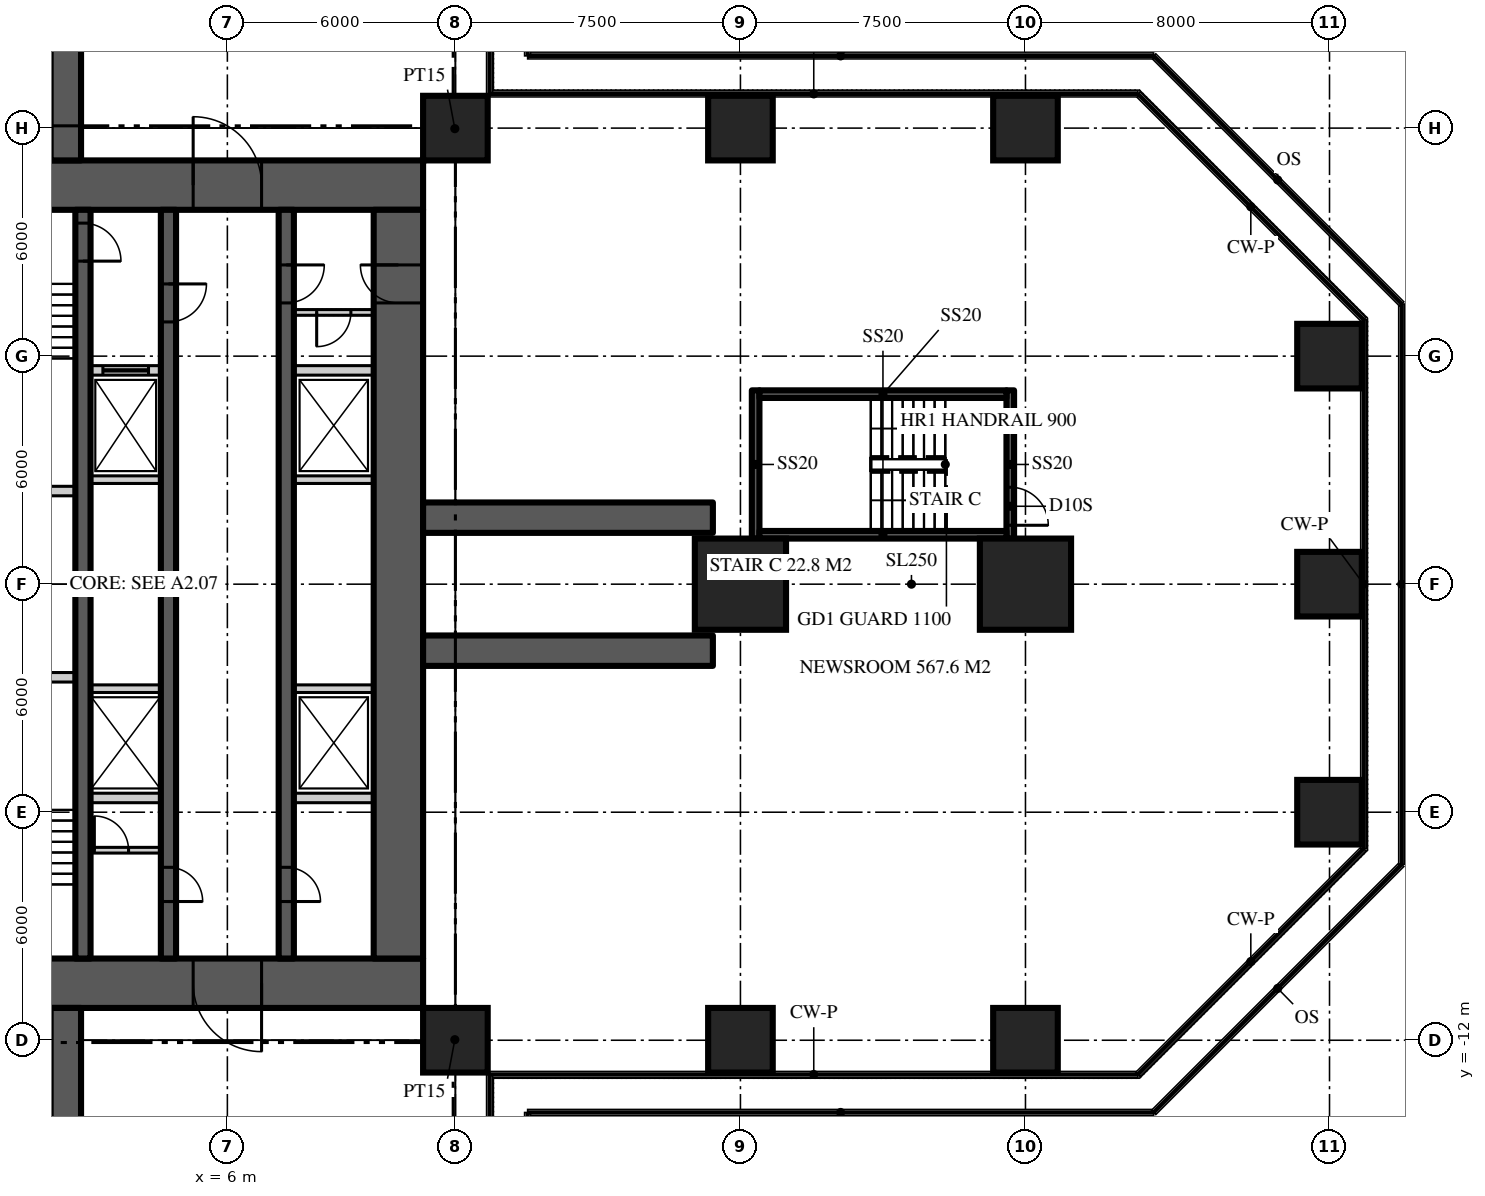
"""IFC4 building model, lengths in metres.
Left out: names, types, materials, properties, quantities, classifications, styles, units other than length and angle.
Written with IfcOpenShell. Run it as: python <this file> out.ifc"""

import sys

from ifc_helpers import new_model, si_unit, direction, frame, frame_2d, origin, origin_2d, place, context, subcontext, project, spatial, rectangle, extrude, element, fill, save


model = new_model("IFC4")
c1 = context("Model", 3, precision=1e-05, world=origin(), true_north=direction((0.0, 1.0)))
c2 = subcontext(c1, "Body", "Model", "MODEL_VIEW")
j1 = project(units=[si_unit("LENGTHUNIT", "METRE"), si_unit("PLANEANGLEUNIT", "RADIAN")], contexts=[c1])
p1 = place(None, origin())
s1 = spatial("IfcSite", under=j1, at=p1, CompositionType="ELEMENT")
p2 = place(p1, origin())
s2 = spatial("IfcBuilding", under=s1, at=p2, CompositionType="ELEMENT")
p3 = place(p2, frame((0.0, 0.0, 28.0)))
s3 = spatial("IfcBuildingStorey", under=s2, at=p3, CompositionType="ELEMENT", Elevation=28.0)
p4 = place(p3, frame((-11.15, 10.5, 0.0), z_axis=(0.0, 0.0, 1.0), x_axis=(1.0, 0.0, 0.0)))
e1 = element("IfcWall", 1, at=p4, inside=s3, PredefinedType="SHEAR", context=c2, shape_type="SweptSolid", body=[
    extrude(rectangle(XDim=22.3, YDim=1.3, at=frame_2d((11.15, 0.0))), origin(), (0.0, 0.0, 1.0), 5.0),
])
p5 = place(p4, frame((4.25, 0.0, 0.0)))
e2 = element("IfcOpeningElement", 2, at=p5, cuts=e1, PredefinedType="OPENING", context=c2, shape_type="SweptSolid", body=[
    extrude(rectangle(XDim=1.8, YDim=2.2, at=frame_2d((0.9, 1.1))), frame((0.0, 0.66, 0.0), z_axis=(0.0, -1.0, 0.0), x_axis=(1.0, 0.0, 0.0)), (0.0, 0.0, 1.0), 1.32),
])
p6 = place(p4, frame((16.25, 0.0, 0.0)))
e3 = element("IfcOpeningElement", 3, at=p6, cuts=e1, PredefinedType="OPENING", context=c2, shape_type="SweptSolid", body=[
    extrude(rectangle(XDim=1.8, YDim=2.2, at=frame_2d((0.9, 1.1))), frame((0.0, 0.66, 0.0), z_axis=(0.0, -1.0, 0.0), x_axis=(1.0, 0.0, 0.0)), (0.0, 0.0, 1.0), 1.32),
])
p7 = place(p3, frame((11.15, -10.5, 0.0), z_axis=(0.0, 0.0, 1.0), x_axis=(-1.0, 0.0, 0.0)))
e4 = element("IfcWall", 4, at=p7, inside=s3, PredefinedType="SHEAR", context=c2, shape_type="SweptSolid", body=[
    extrude(rectangle(XDim=22.3, YDim=1.3, at=frame_2d((11.15, 0.0))), origin(), (0.0, 0.0, 1.0), 5.0),
])
p8 = place(p7, frame((16.25, 0.0, 0.0)))
e5 = element("IfcOpeningElement", 5, at=p8, cuts=e4, PredefinedType="OPENING", context=c2, shape_type="SweptSolid", body=[
    extrude(rectangle(XDim=1.8, YDim=2.2, at=frame_2d((0.9, 1.1))), frame((0.0, 0.66, 0.0), z_axis=(0.0, -1.0, 0.0), x_axis=(1.0, 0.0, 0.0)), (0.0, 0.0, 1.0), 1.32),
])
p9 = place(p7, frame((4.25, 0.0, 0.0)))
e6 = element("IfcOpeningElement", 6, at=p9, cuts=e4, PredefinedType="OPENING", context=c2, shape_type="SweptSolid", body=[
    extrude(rectangle(XDim=1.8, YDim=2.2, at=frame_2d((0.9, 1.1))), frame((0.0, 0.66, 0.0), z_axis=(0.0, -1.0, 0.0), x_axis=(1.0, 0.0, 0.0)), (0.0, 0.0, 1.0), 1.32),
])
p10 = place(p3, frame((10.5, -9.85, 0.0), z_axis=(0.0, 0.0, 1.0), x_axis=(0.0, 1.0, 0.0)))
e7 = element("IfcWall", 7, at=p10, inside=s3, PredefinedType="SHEAR", context=c2, shape_type="SweptSolid", body=[
    extrude(rectangle(XDim=19.7, YDim=1.3, at=frame_2d((9.85, 0.0))), origin(), (0.0, 0.0, 1.0), 5.0),
])
p11 = place(p10, frame((17.25, 0.0, 0.0)))
e8 = element("IfcOpeningElement", 8, at=p11, cuts=e7, PredefinedType="OPENING", context=c2, shape_type="SweptSolid", body=[
    extrude(rectangle(XDim=1.0, YDim=2.2, at=frame_2d((0.5, 1.1))), frame((0.0, 0.66, 0.0), z_axis=(0.0, -1.0, 0.0), x_axis=(1.0, 0.0, 0.0)), (0.0, 0.0, 1.0), 1.32),
])
for number, where, z_axis, x_axis in (
    (9, (11.15, -1.75, 0.0), (0.0, 0.0, 1.0), (1.0, 0.0, 0.0)),
    (10, (11.15, 1.75, 0.0), (0.0, 0.0, 1.0), (1.0, 0.0, 0.0)),
    (11, (1.75, 11.15, 0.0), (0.0, 0.0, 1.0), (0.0, 1.0, 0.0)),
    (12, (1.75, -11.15, 0.0), (0.0, 0.0, 1.0), (0.0, -1.0, 0.0)),
):
    element("IfcWall", number, at=place(p3, frame(where, z_axis=z_axis, x_axis=x_axis)), inside=s3, PredefinedType="SHEAR", context=c2, shape_type="SweptSolid", body=[
        extrude(rectangle(XDim=7.625, YDim=0.8, at=frame_2d((3.812, 0.0))), origin(), (0.0, 0.0, 1.0), 5.0),
    ])
for number, where, z_axis, x_axis in (
    (13, (12.0, -12.0, 0.0), (0.0, 0.0, 1.0), (1.0, 0.0, 0.0)),
    (14, (19.5, -12.0, 0.0), (0.0, 0.0, 1.0), (1.0, 0.0, 0.0)),
    (15, (27.0, -12.0, 0.0), (0.0, 0.0, 1.0), (1.0, 0.0, 0.0)),
    (16, (35.0, -6.0, 0.0), (0.0, 0.0, 1.0), (1.0, 0.0, 0.0)),
):
    element("IfcColumn", number, at=place(p3, frame(where, z_axis=z_axis, x_axis=x_axis)), inside=s3, PredefinedType="COLUMN", context=c2, shape_type="SweptSolid", body=[
        extrude(rectangle(XDim=1.7, YDim=1.7, at=origin_2d()), origin(), (0.0, 0.0, 1.0), 5.0),
    ])
for number, where, z_axis, x_axis in (
    (17, (19.5, 0.0, 0.0), (0.0, 0.0, 1.0), (1.0, 0.0, 0.0)),
    (18, (27.0, 0.0, 0.0), (0.0, 0.0, 1.0), (1.0, 0.0, 0.0)),
):
    element("IfcColumn", number, at=place(p3, frame(where, z_axis=z_axis, x_axis=x_axis)), inside=s3, PredefinedType="COLUMN", context=c2, shape_type="SweptSolid", body=[
        extrude(rectangle(XDim=2.4, YDim=2.4, at=origin_2d()), origin(), (0.0, 0.0, 1.0), 5.0),
    ])
for number, where, z_axis, x_axis in (
    (19, (35.0, 0.0, 0.0), (0.0, 0.0, 1.0), (1.0, 0.0, 0.0)),
    (20, (35.0, 6.0, 0.0), (0.0, 0.0, 1.0), (1.0, 0.0, 0.0)),
    (21, (12.0, 12.0, 0.0), (0.0, 0.0, 1.0), (1.0, 0.0, 0.0)),
    (22, (19.5, 12.0, 0.0), (0.0, 0.0, 1.0), (1.0, 0.0, 0.0)),
    (23, (27.0, 12.0, 0.0), (0.0, 0.0, 1.0), (1.0, 0.0, 0.0)),
):
    element("IfcColumn", number, at=place(p3, frame(where, z_axis=z_axis, x_axis=x_axis)), inside=s3, PredefinedType="COLUMN", context=c2, shape_type="SweptSolid", body=[
        extrude(rectangle(XDim=1.7, YDim=1.7, at=origin_2d()), origin(), (0.0, 0.0, 1.0), 5.0),
    ])
p12 = place(p3, frame((7.55, 9.85, 0.0), z_axis=(0.0, 0.0, 1.0), x_axis=(0.0, -1.0, 0.0)))
e24 = element("IfcWall", 24, at=p12, inside=s3, PredefinedType="SHEAR", context=c2, shape_type="SweptSolid", body=[
    extrude(rectangle(XDim=19.7, YDim=0.4, at=frame_2d((9.85, 0.0))), origin(), (0.0, 0.0, 1.0), 5.0),
])
p13 = place(p12, frame((1.45, 0.0, 0.0)))
e25 = element("IfcOpeningElement", 25, at=p13, cuts=e24, PredefinedType="OPENING", context=c2, shape_type="SweptSolid", body=[
    extrude(rectangle(XDim=1.0, YDim=2.2, at=frame_2d((0.5, 1.1))), frame((0.0, 0.21, 0.0), z_axis=(0.0, -1.0, 0.0), x_axis=(1.0, 0.0, 0.0)), (0.0, 0.0, 1.0), 0.42),
])
p14 = place(p12, frame((17.3, 0.0, 0.0)))
e26 = element("IfcOpeningElement", 26, at=p14, cuts=e24, PredefinedType="OPENING", context=c2, shape_type="SweptSolid", body=[
    extrude(rectangle(XDim=0.9, YDim=2.1, at=frame_2d((0.45, 1.05))), frame((0.0, 0.21, 0.0), z_axis=(0.0, -1.0, 0.0), x_axis=(1.0, 0.0, 0.0)), (0.0, 0.0, 1.0), 0.42),
])
p15 = place(p3, frame((4.45, 9.85, 0.0), z_axis=(0.0, 0.0, 1.0), x_axis=(0.0, -1.0, 0.0)))
e27 = element("IfcWall", 27, at=p15, inside=s3, PredefinedType="SHEAR", context=c2, shape_type="SweptSolid", body=[
    extrude(rectangle(XDim=19.7, YDim=0.4, at=frame_2d((9.85, 0.0))), origin(), (0.0, 0.0, 1.0), 5.0),
])
p16 = place(p15, frame((1.95, 0.0, 0.0)))
e28 = element("IfcOpeningElement", 28, at=p16, cuts=e27, PredefinedType="OPENING", context=c2, shape_type="SweptSolid", body=[
    extrude(rectangle(XDim=1.0, YDim=2.2, at=frame_2d((0.5, 1.1))), frame((0.0, 0.21, 0.0), z_axis=(0.0, -1.0, 0.0), x_axis=(1.0, 0.0, 0.0)), (0.0, 0.0, 1.0), 0.42),
])
p17 = place(p15, frame((17.3, 0.0, 0.0)))
e29 = element("IfcOpeningElement", 29, at=p17, cuts=e27, PredefinedType="OPENING", context=c2, shape_type="SweptSolid", body=[
    extrude(rectangle(XDim=0.9, YDim=2.1, at=frame_2d((0.45, 1.05))), frame((0.0, 0.21, 0.0), z_axis=(0.0, -1.0, 0.0), x_axis=(1.0, 0.0, 0.0)), (0.0, 0.0, 1.0), 0.42),
])
p18 = place(p3, frame((2.2, 9.85, 0.0), z_axis=(0.0, 0.0, 1.0), x_axis=(0.0, -1.0, 0.0)))
e30 = element("IfcWall", 30, at=p18, inside=s3, PredefinedType="SHEAR", context=c2, shape_type="SweptSolid", body=[
    extrude(rectangle(XDim=19.7, YDim=0.4, at=frame_2d((9.85, 0.0))), origin(), (0.0, 0.0, 1.0), 5.0),
])
p19 = place(p18, frame((0.35, 0.0, 0.0)))
e31 = element("IfcOpeningElement", 31, at=p19, cuts=e30, PredefinedType="OPENING", context=c2, shape_type="SweptSolid", body=[
    extrude(rectangle(XDim=1.0, YDim=2.2, at=frame_2d((0.5, 1.1))), frame((0.0, 0.21, 0.0), z_axis=(0.0, -1.0, 0.0), x_axis=(1.0, 0.0, 0.0)), (0.0, 0.0, 1.0), 0.42),
])
p20 = place(p3, frame((2.4, 5.625, 0.0), z_axis=(0.0, 0.0, 1.0), x_axis=(1.0, 0.0, 0.0)))
e32 = element("IfcWall", 32, at=p20, inside=s3, PredefinedType="SOLIDWALL", context=c2, shape_type="SweptSolid", body=[
    extrude(rectangle(XDim=1.85, YDim=0.25, at=frame_2d((0.925, 0.0))), origin(), (0.0, 0.0, 1.0), 4.8),
])
p21 = place(p20, frame((0.325, 0.0, 0.0)))
e33 = element("IfcOpeningElement", 33, at=p21, cuts=e32, PredefinedType="OPENING", context=c2, shape_type="SweptSolid", body=[
    extrude(rectangle(XDim=1.2, YDim=2.2, at=frame_2d((0.6, 1.1))), frame((0.0, 0.135, 0.0), z_axis=(0.0, -1.0, 0.0), x_axis=(1.0, 0.0, 0.0)), (0.0, 0.0, 1.0), 0.27),
])
p22 = place(p3, frame((7.75, 5.625, 0.0), z_axis=(0.0, 0.0, 1.0), x_axis=(1.0, 0.0, 0.0)))
e34 = element("IfcWall", 34, at=p22, inside=s3, PredefinedType="SOLIDWALL", context=c2, shape_type="SweptSolid", body=[
    extrude(rectangle(XDim=2.1, YDim=0.25, at=frame_2d((1.05, 0.0))), origin(), (0.0, 0.0, 1.0), 4.8),
])
p23 = place(p3, frame((2.4, -5.625, 0.0), z_axis=(0.0, 0.0, 1.0), x_axis=(1.0, 0.0, 0.0)))
e35 = element("IfcWall", 35, at=p23, inside=s3, PredefinedType="SOLIDWALL", context=c2, shape_type="SweptSolid", body=[
    extrude(rectangle(XDim=1.85, YDim=0.25, at=frame_2d((0.925, 0.0))), origin(), (0.0, 0.0, 1.0), 4.8),
])
p24 = place(p3, frame((7.75, -5.625, 0.0), z_axis=(0.0, 0.0, 1.0), x_axis=(1.0, 0.0, 0.0)))
e36 = element("IfcWall", 36, at=p24, inside=s3, PredefinedType="SOLIDWALL", context=c2, shape_type="SweptSolid", body=[
    extrude(rectangle(XDim=2.1, YDim=0.25, at=frame_2d((1.05, 0.0))), origin(), (0.0, 0.0, 1.0), 4.8),
])
for number, where, z_axis, x_axis in (
    (37, (-2.0, -2.45, 0.0), (0.0, 0.0, 1.0), (1.0, 0.0, 0.0)),
    (38, (-2.0, 2.45, 0.0), (0.0, 0.0, 1.0), (1.0, 0.0, 0.0)),
):
    element("IfcWall", number, at=place(p3, frame(where, z_axis=z_axis, x_axis=x_axis)), inside=s3, PredefinedType="SOLIDWALL", context=c2, shape_type="SweptSolid", body=[
        extrude(rectangle(XDim=4.0, YDim=0.25, at=frame_2d((2.0, 0.0))), origin(), (0.0, 0.0, 1.0), 4.8),
    ])
p25 = place(p3, frame((2.4, -2.75, 0.0), z_axis=(0.0, 0.0, 1.0), x_axis=(1.0, 0.0, 0.0)))
e39 = element("IfcWall", 39, at=p25, inside=s3, PredefinedType="SOLIDWALL", context=c2, shape_type="SweptSolid", body=[
    extrude(rectangle(XDim=1.85, YDim=0.2, at=frame_2d((0.925, 0.0))), origin(), (0.0, 0.0, 1.0), 4.8),
])
p26 = place(p3, frame((7.75, -2.75, 0.0), z_axis=(0.0, 0.0, 1.0), x_axis=(1.0, 0.0, 0.0)))
e40 = element("IfcWall", 40, at=p26, inside=s3, PredefinedType="SOLIDWALL", context=c2, shape_type="SweptSolid", body=[
    extrude(rectangle(XDim=2.1, YDim=0.2, at=frame_2d((1.05, 0.0))), origin(), (0.0, 0.0, 1.0), 4.8),
])
p27 = place(p3, frame((2.4, 2.75, 0.0), z_axis=(0.0, 0.0, 1.0), x_axis=(1.0, 0.0, 0.0)))
e41 = element("IfcWall", 41, at=p27, inside=s3, PredefinedType="SOLIDWALL", context=c2, shape_type="SweptSolid", body=[
    extrude(rectangle(XDim=1.85, YDim=0.2, at=frame_2d((0.925, 0.0))), origin(), (0.0, 0.0, 1.0), 4.8),
])
p28 = place(p3, frame((7.75, 2.75, 0.0), z_axis=(0.0, 0.0, 1.0), x_axis=(1.0, 0.0, 0.0)))
e42 = element("IfcWall", 42, at=p28, inside=s3, PredefinedType="SOLIDWALL", context=c2, shape_type="SweptSolid", body=[
    extrude(rectangle(XDim=2.1, YDim=0.2, at=frame_2d((1.05, 0.0))), origin(), (0.0, 0.0, 1.0), 4.8),
])
for number, where, z_axis, x_axis in (
    (43, (11.15, 11.15, 0.0), (0.0, 0.0, 1.0), (0.707, 0.707, 0.0)),
    (44, (11.15, -11.15, 0.0), (0.0, 0.0, 1.0), (0.707, -0.707, 0.0)),
):
    element("IfcWall", number, at=place(p3, frame(where, z_axis=z_axis, x_axis=x_axis)), inside=s3, PredefinedType="PARTITIONING", context=c2, shape_type="SweptSolid", body=[
        extrude(rectangle(XDim=2.362, YDim=0.15, at=frame_2d((1.181, 0.0))), origin(), (0.0, 0.0, 1.0), 4.75),
    ])
p29 = place(p3, frame((2.4, -7.0, 0.0), z_axis=(0.0, 0.0, 1.0), x_axis=(1.0, 0.0, 0.0)))
e45 = element("IfcWall", 45, at=p29, inside=s3, PredefinedType="SOLIDWALL", context=c2, shape_type="SweptSolid", body=[
    extrude(rectangle(XDim=1.85, YDim=0.15, at=frame_2d((0.925, 0.0))), origin(), (0.0, 0.0, 1.0), 4.75),
])
p30 = place(p29, frame((0.1, 0.0, 0.0)))
e46 = element("IfcOpeningElement", 46, at=p30, cuts=e45, PredefinedType="OPENING", context=c2, shape_type="SweptSolid", body=[
    extrude(rectangle(XDim=0.9, YDim=2.1, at=frame_2d((0.45, 1.05))), frame((0.0, 0.085, 0.0), z_axis=(0.0, -1.0, 0.0), x_axis=(1.0, 0.0, 0.0)), (0.0, 0.0, 1.0), 0.17),
])
p31 = place(p3, frame((9.85, 7.15, 0.0), z_axis=(0.0, 0.0, 1.0), x_axis=(-1.0, 0.0, 0.0)))
e47 = element("IfcWall", 47, at=p31, inside=s3, PredefinedType="SOLIDWALL", context=c2, shape_type="SweptSolid", body=[
    extrude(rectangle(XDim=2.1, YDim=0.15, at=frame_2d((1.05, 0.0))), origin(), (0.0, 0.0, 1.0), 4.75),
])
p32 = place(p31, frame((0.6, 0.0, 0.0)))
e48 = element("IfcOpeningElement", 48, at=p32, cuts=e47, PredefinedType="OPENING", context=c2, shape_type="SweptSolid", body=[
    extrude(rectangle(XDim=0.9, YDim=2.1, at=frame_2d((0.45, 1.05))), frame((0.0, 0.085, 0.0), z_axis=(0.0, -1.0, 0.0), x_axis=(1.0, 0.0, 0.0)), (0.0, 0.0, 1.0), 0.17),
])
p33 = place(p3, frame((19.9, 1.2, 0.0), z_axis=(0.0, 0.0, 1.0), x_axis=(0.0, 1.0, 0.0)))
e49 = element("IfcWall", 49, at=p33, inside=s3, PredefinedType="SOLIDWALL", context=c2, shape_type="SweptSolid", body=[
    extrude(rectangle(XDim=3.9, YDim=0.2, at=frame_2d((1.95, 0.0))), origin(), (0.0, 0.0, 1.0), 4.75),
])
p34 = place(p3, frame((26.6, 5.1, 0.0), z_axis=(0.0, 0.0, 1.0), x_axis=(0.0, -1.0, 0.0)))
e50 = element("IfcWall", 50, at=p34, inside=s3, PredefinedType="SOLIDWALL", context=c2, shape_type="SweptSolid", body=[
    extrude(rectangle(XDim=3.9, YDim=0.2, at=frame_2d((1.95, 0.0))), origin(), (0.0, 0.0, 1.0), 4.75),
])
p35 = place(p34, frame((2.55, 0.0, 0.0)))
e51 = element("IfcOpeningElement", 51, at=p35, cuts=e50, PredefinedType="OPENING", context=c2, shape_type="SweptSolid", body=[
    extrude(rectangle(XDim=1.0, YDim=2.2, at=frame_2d((0.5, 1.1))), frame((0.0, 0.11, 0.0), z_axis=(0.0, -1.0, 0.0), x_axis=(1.0, 0.0, 0.0)), (0.0, 0.0, 1.0), 0.22),
])
for number, where, z_axis, x_axis in (
    (52, (20.0, 1.3, 0.0), (0.0, 0.0, 1.0), (1.0, 0.0, 0.0)),
    (53, (26.5, 5.0, 0.0), (0.0, 0.0, 1.0), (-1.0, 0.0, 0.0)),
):
    element("IfcWall", number, at=place(p3, frame(where, z_axis=z_axis, x_axis=x_axis)), inside=s3, PredefinedType="SOLIDWALL", context=c2, shape_type="SweptSolid", body=[
        extrude(rectangle(XDim=6.5, YDim=0.2, at=frame_2d((3.25, 0.0))), origin(), (0.0, 0.0, 1.0), 4.75),
    ])
p36 = place(p6, origin())
e54 = element("IfcDoor", 54, at=p36, inside=s3, OperationType="DOUBLE_DOOR_DOUBLE_SWING", PredefinedType="DOOR", context=c2, shape_type="SweptSolid", body=[
    extrude(rectangle(XDim=1.8, YDim=2.2, at=frame_2d((0.9, 1.1))), frame((0.0, 0.025, 0.0), z_axis=(0.0, -1.0, 0.0), x_axis=(1.0, 0.0, 0.0)), (0.0, 0.0, 1.0), 0.05),
])
fill(e3, e54)
p37 = place(p9, origin())
e55 = element("IfcDoor", 55, at=p37, inside=s3, OperationType="DOUBLE_DOOR_DOUBLE_SWING", PredefinedType="DOOR", context=c2, shape_type="SweptSolid", body=[
    extrude(rectangle(XDim=1.8, YDim=2.2, at=frame_2d((0.9, 1.1))), frame((0.0, 0.025, 0.0), z_axis=(0.0, -1.0, 0.0), x_axis=(1.0, 0.0, 0.0)), (0.0, 0.0, 1.0), 0.05),
])
fill(e6, e55)
p38 = place(p13, origin())
e56 = element("IfcDoor", 56, at=p38, inside=s3, OperationType="SINGLE_SWING_LEFT", PredefinedType="DOOR", context=c2, shape_type="SweptSolid", body=[
    extrude(rectangle(XDim=1.0, YDim=2.2, at=frame_2d((0.5, 1.1))), frame((0.0, 0.025, 0.0), z_axis=(0.0, -1.0, 0.0), x_axis=(1.0, 0.0, 0.0)), (0.0, 0.0, 1.0), 0.05),
])
fill(e25, e56)
p39 = place(p11, origin())
e57 = element("IfcDoor", 57, at=p39, inside=s3, OperationType="SINGLE_SWING_RIGHT", PredefinedType="DOOR", context=c2, shape_type="SweptSolid", body=[
    extrude(rectangle(XDim=1.0, YDim=2.2, at=frame_2d((0.5, 1.1))), frame((0.0, 0.025, 0.0), z_axis=(0.0, -1.0, 0.0), x_axis=(1.0, 0.0, 0.0)), (0.0, 0.0, 1.0), 0.05),
])
fill(e8, e57)
p40 = place(p16, origin())
e58 = element("IfcDoor", 58, at=p40, inside=s3, OperationType="SINGLE_SWING_LEFT", PredefinedType="DOOR", context=c2, shape_type="SweptSolid", body=[
    extrude(rectangle(XDim=1.0, YDim=2.2, at=frame_2d((0.5, 1.1))), frame((0.0, 0.025, 0.0), z_axis=(0.0, -1.0, 0.0), x_axis=(1.0, 0.0, 0.0)), (0.0, 0.0, 1.0), 0.05),
])
fill(e28, e58)
p41 = place(p19, origin())
e59 = element("IfcDoor", 59, at=p41, inside=s3, OperationType="SINGLE_SWING_RIGHT", PredefinedType="DOOR", context=c2, shape_type="SweptSolid", body=[
    extrude(rectangle(XDim=1.0, YDim=2.2, at=frame_2d((0.5, 1.1))), frame((0.0, 0.025, 0.0), z_axis=(0.0, -1.0, 0.0), x_axis=(1.0, 0.0, 0.0)), (0.0, 0.0, 1.0), 0.05),
])
fill(e31, e59)
p42 = place(p14, origin())
e60 = element("IfcDoor", 60, at=p42, inside=s3, OperationType="SINGLE_SWING_RIGHT", PredefinedType="DOOR", context=c2, shape_type="SweptSolid", body=[
    extrude(rectangle(XDim=0.9, YDim=2.1, at=frame_2d((0.45, 1.05))), frame((0.0, 0.025, 0.0), z_axis=(0.0, -1.0, 0.0), x_axis=(1.0, 0.0, 0.0)), (0.0, 0.0, 1.0), 0.05),
])
fill(e26, e60)
p43 = place(p17, origin())
e61 = element("IfcDoor", 61, at=p43, inside=s3, OperationType="SINGLE_SWING_RIGHT", PredefinedType="DOOR", context=c2, shape_type="SweptSolid", body=[
    extrude(rectangle(XDim=0.9, YDim=2.1, at=frame_2d((0.45, 1.05))), frame((0.0, 0.025, 0.0), z_axis=(0.0, -1.0, 0.0), x_axis=(1.0, 0.0, 0.0)), (0.0, 0.0, 1.0), 0.05),
])
fill(e29, e61)
p44 = place(p21, origin())
e62 = element("IfcDoor", 62, at=p44, inside=s3, OperationType="SLIDING_TO_LEFT", PredefinedType="DOOR", context=c2, shape_type="SweptSolid", body=[
    extrude(rectangle(XDim=1.2, YDim=2.2, at=frame_2d((0.6, 1.1))), frame((0.0, 0.025, 0.0), z_axis=(0.0, -1.0, 0.0), x_axis=(1.0, 0.0, 0.0)), (0.0, 0.0, 1.0), 0.05),
])
fill(e33, e62)
p45 = place(p30, origin())
e63 = element("IfcDoor", 63, at=p45, inside=s3, OperationType="SINGLE_SWING_LEFT", PredefinedType="DOOR", context=c2, shape_type="SweptSolid", body=[
    extrude(rectangle(XDim=0.9, YDim=2.1, at=frame_2d((0.45, 1.05))), frame((0.0, 0.025, 0.0), z_axis=(0.0, -1.0, 0.0), x_axis=(1.0, 0.0, 0.0)), (0.0, 0.0, 1.0), 0.05),
])
fill(e46, e63)
p46 = place(p32, origin())
e64 = element("IfcDoor", 64, at=p46, inside=s3, OperationType="SINGLE_SWING_RIGHT", PredefinedType="DOOR", context=c2, shape_type="SweptSolid", body=[
    extrude(rectangle(XDim=0.9, YDim=2.1, at=frame_2d((0.45, 1.05))), frame((0.0, 0.025, 0.0), z_axis=(0.0, -1.0, 0.0), x_axis=(1.0, 0.0, 0.0)), (0.0, 0.0, 1.0), 0.05),
])
fill(e48, e64)
p47 = place(p35, origin())
e65 = element("IfcDoor", 65, at=p47, inside=s3, OperationType="SINGLE_SWING_RIGHT", PredefinedType="DOOR", context=c2, shape_type="SweptSolid", body=[
    extrude(rectangle(XDim=1.0, YDim=2.2, at=frame_2d((0.5, 1.1))), frame((0.0, 0.025, 0.0), z_axis=(0.0, -1.0, 0.0), x_axis=(1.0, 0.0, 0.0)), (0.0, 0.0, 1.0), 0.05),
])
fill(e51, e65)
save(model, sys.argv[1])
